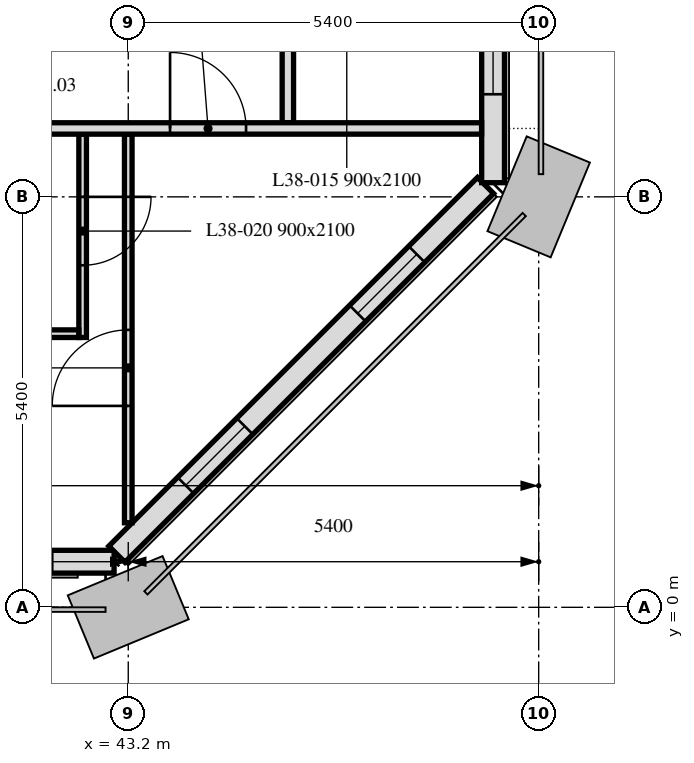
"""IFC4 building model, lengths in metres.
Left out: names, types, materials, properties, quantities, classifications, styles, units other than length and angle.
Written with IfcOpenShell. Run it as: python <this file> out.ifc"""

import sys

from ifc_helpers import new_model, si_unit, direction, frame, frame_2d, origin, place, context, subcontext, project, spatial, rectangle, extrude, element, fill, save


model = new_model("IFC4")
c1 = context("Model", 3, precision=1e-05, world=origin(), true_north=direction((0.0, 1.0)))
c2 = subcontext(c1, "Body", "Model", "MODEL_VIEW")
j1 = project(units=[si_unit("LENGTHUNIT", "METRE"), si_unit("PLANEANGLEUNIT", "RADIAN")], contexts=[c1])
p1 = place(None, origin())
s1 = spatial("IfcSite", under=j1, at=p1, CompositionType="ELEMENT")
p2 = place(p1, origin())
s2 = spatial("IfcBuilding", under=s1, at=p2, CompositionType="ELEMENT")
p3 = place(p2, frame((0.0, 0.0, 162.7)))
s3 = spatial("IfcBuildingStorey", under=s2, at=p3, CompositionType="ELEMENT", Elevation=162.7)
p4 = place(p3, frame((10.986, 0.6, 0.0), z_axis=(0.0, 0.0, 1.0), x_axis=(1.0, 0.0, 0.0)))
e1 = element("IfcWall", 1, at=p4, inside=s3, PredefinedType="SOLIDWALL", context=c2, shape_type="SweptSolid", body=[
    extrude(rectangle(XDim=32.027, YDim=0.3, at=frame_2d((16.014, 0.0))), origin(), (0.0, 0.0, 1.0), 3.0),
])
p5 = place(p4, frame((2.764, 0.0, 0.9)))
e2 = element("IfcOpeningElement", 2, at=p5, cuts=e1, PredefinedType="OPENING", context=c2, shape_type="SweptSolid", body=[
    extrude(rectangle(XDim=1.1, YDim=1.7, at=frame_2d((0.55, 0.85))), frame((0.0, 0.16, 0.0), z_axis=(0.0, -1.0, 0.0), x_axis=(1.0, 0.0, 0.0)), (0.0, 0.0, 1.0), 0.32),
])
p6 = place(p4, frame((6.214, 0.0, 0.9)))
e3 = element("IfcOpeningElement", 3, at=p6, cuts=e1, PredefinedType="OPENING", context=c2, shape_type="SweptSolid", body=[
    extrude(rectangle(XDim=3.4, YDim=1.7, at=frame_2d((1.7, 0.85))), frame((0.0, 0.16, 0.0), z_axis=(0.0, -1.0, 0.0), x_axis=(1.0, 0.0, 0.0)), (0.0, 0.0, 1.0), 0.32),
])
p7 = place(p4, frame((13.564, 0.0, 0.9)))
e4 = element("IfcOpeningElement", 4, at=p7, cuts=e1, PredefinedType="OPENING", context=c2, shape_type="SweptSolid", body=[
    extrude(rectangle(XDim=1.1, YDim=1.7, at=frame_2d((0.55, 0.85))), frame((0.0, 0.16, 0.0), z_axis=(0.0, -1.0, 0.0), x_axis=(1.0, 0.0, 0.0)), (0.0, 0.0, 1.0), 0.32),
])
p8 = place(p4, frame((17.014, 0.0, 0.9)))
e5 = element("IfcOpeningElement", 5, at=p8, cuts=e1, PredefinedType="OPENING", context=c2, shape_type="SweptSolid", body=[
    extrude(rectangle(XDim=3.4, YDim=1.7, at=frame_2d((1.7, 0.85))), frame((0.0, 0.16, 0.0), z_axis=(0.0, -1.0, 0.0), x_axis=(1.0, 0.0, 0.0)), (0.0, 0.0, 1.0), 0.32),
])
p9 = place(p4, frame((24.364, 0.0, 0.9)))
e6 = element("IfcOpeningElement", 6, at=p9, cuts=e1, PredefinedType="OPENING", context=c2, shape_type="SweptSolid", body=[
    extrude(rectangle(XDim=1.1, YDim=1.7, at=frame_2d((0.55, 0.85))), frame((0.0, 0.16, 0.0), z_axis=(0.0, -1.0, 0.0), x_axis=(1.0, 0.0, 0.0)), (0.0, 0.0, 1.0), 0.32),
])
p10 = place(p4, frame((27.814, 0.0, 0.9)))
e7 = element("IfcOpeningElement", 7, at=p10, cuts=e1, PredefinedType="OPENING", context=c2, shape_type="SweptSolid", body=[
    extrude(rectangle(XDim=3.4, YDim=1.7, at=frame_2d((1.7, 0.85))), frame((0.0, 0.16, 0.0), z_axis=(0.0, -1.0, 0.0), x_axis=(1.0, 0.0, 0.0)), (0.0, 0.0, 1.0), 0.32),
])
p11 = place(p3, frame((43.051, 0.699, 0.0), z_axis=(0.0, 0.0, 1.0), x_axis=(0.707106781187, 0.707106781187, 0.0)))
e8 = element("IfcWall", 8, at=p11, inside=s3, PredefinedType="SOLIDWALL", context=c2, shape_type="SweptSolid", body=[
    extrude(rectangle(XDim=6.86, YDim=0.3, at=frame_2d((3.43, 0.0))), origin(), (0.0, 0.0, 1.0), 3.0),
])
p12 = place(p11, frame((1.28, 0.0, 0.9)))
e9 = element("IfcOpeningElement", 9, at=p12, cuts=e8, PredefinedType="OPENING", context=c2, shape_type="SweptSolid", body=[
    extrude(rectangle(XDim=1.1, YDim=1.7, at=frame_2d((0.55, 0.85))), frame((0.0, 0.16, 0.0), z_axis=(0.0, -1.0, 0.0), x_axis=(1.0, 0.0, 0.0)), (0.0, 0.0, 1.0), 0.32),
])
p13 = place(p11, frame((4.48, 0.0, 0.9)))
e10 = element("IfcOpeningElement", 10, at=p13, cuts=e8, PredefinedType="OPENING", context=c2, shape_type="SweptSolid", body=[
    extrude(rectangle(XDim=1.1, YDim=1.7, at=frame_2d((0.55, 0.85))), frame((0.0, 0.16, 0.0), z_axis=(0.0, -1.0, 0.0), x_axis=(1.0, 0.0, 0.0)), (0.0, 0.0, 1.0), 0.32),
])
p14 = place(p3, frame((48.0, 5.586, 0.0), z_axis=(0.0, 0.0, 1.0), x_axis=(0.0, 1.0, 0.0)))
e11 = element("IfcWall", 11, at=p14, inside=s3, PredefinedType="SOLIDWALL", context=c2, shape_type="SweptSolid", body=[
    extrude(rectangle(XDim=32.027, YDim=0.3, at=frame_2d((16.014, 0.0))), origin(), (0.0, 0.0, 1.0), 3.0),
])
p15 = place(p14, frame((1.164, 0.0, 0.9)))
e12 = element("IfcOpeningElement", 12, at=p15, cuts=e11, PredefinedType="OPENING", context=c2, shape_type="SweptSolid", body=[
    extrude(rectangle(XDim=1.1, YDim=1.7, at=frame_2d((0.55, 0.85))), frame((0.0, 0.16, 0.0), z_axis=(0.0, -1.0, 0.0), x_axis=(1.0, 0.0, 0.0)), (0.0, 0.0, 1.0), 0.32),
])
p16 = place(p14, frame((2.589, 0.0, 0.9)))
e13 = element("IfcOpeningElement", 13, at=p16, cuts=e11, PredefinedType="OPENING", context=c2, shape_type="SweptSolid", body=[
    extrude(rectangle(XDim=0.65, YDim=1.7, at=frame_2d((0.325, 0.85))), frame((0.0, 0.16, 0.0), z_axis=(0.0, -1.0, 0.0), x_axis=(1.0, 0.0, 0.0)), (0.0, 0.0, 1.0), 0.32),
])
p17 = place(p14, frame((6.214, 0.0, 0.9)))
e14 = element("IfcOpeningElement", 14, at=p17, cuts=e11, PredefinedType="OPENING", context=c2, shape_type="SweptSolid", body=[
    extrude(rectangle(XDim=3.4, YDim=1.7, at=frame_2d((1.7, 0.85))), frame((0.0, 0.16, 0.0), z_axis=(0.0, -1.0, 0.0), x_axis=(1.0, 0.0, 0.0)), (0.0, 0.0, 1.0), 0.32),
])
p18 = place(p14, frame((11.964, 0.0, 0.9)))
e15 = element("IfcOpeningElement", 15, at=p18, cuts=e11, PredefinedType="OPENING", context=c2, shape_type="SweptSolid", body=[
    extrude(rectangle(XDim=1.1, YDim=1.7, at=frame_2d((0.55, 0.85))), frame((0.0, 0.16, 0.0), z_axis=(0.0, -1.0, 0.0), x_axis=(1.0, 0.0, 0.0)), (0.0, 0.0, 1.0), 0.32),
])
p19 = place(p14, frame((13.564, 0.0, 0.9)))
e16 = element("IfcOpeningElement", 16, at=p19, cuts=e11, PredefinedType="OPENING", context=c2, shape_type="SweptSolid", body=[
    extrude(rectangle(XDim=1.1, YDim=1.7, at=frame_2d((0.55, 0.85))), frame((0.0, 0.16, 0.0), z_axis=(0.0, -1.0, 0.0), x_axis=(1.0, 0.0, 0.0)), (0.0, 0.0, 1.0), 0.32),
])
p20 = place(p14, frame((17.364, 0.0, 0.9)))
e17 = element("IfcOpeningElement", 17, at=p20, cuts=e11, PredefinedType="OPENING", context=c2, shape_type="SweptSolid", body=[
    extrude(rectangle(XDim=1.1, YDim=1.7, at=frame_2d((0.55, 0.85))), frame((0.0, 0.16, 0.0), z_axis=(0.0, -1.0, 0.0), x_axis=(1.0, 0.0, 0.0)), (0.0, 0.0, 1.0), 0.32),
])
p21 = place(p14, frame((18.964, 0.0, 0.9)))
e18 = element("IfcOpeningElement", 18, at=p21, cuts=e11, PredefinedType="OPENING", context=c2, shape_type="SweptSolid", body=[
    extrude(rectangle(XDim=1.1, YDim=1.7, at=frame_2d((0.55, 0.85))), frame((0.0, 0.16, 0.0), z_axis=(0.0, -1.0, 0.0), x_axis=(1.0, 0.0, 0.0)), (0.0, 0.0, 1.0), 0.32),
])
p22 = place(p14, frame((22.764, 0.0, 0.9)))
e19 = element("IfcOpeningElement", 19, at=p22, cuts=e11, PredefinedType="OPENING", context=c2, shape_type="SweptSolid", body=[
    extrude(rectangle(XDim=1.1, YDim=1.7, at=frame_2d((0.55, 0.85))), frame((0.0, 0.16, 0.0), z_axis=(0.0, -1.0, 0.0), x_axis=(1.0, 0.0, 0.0)), (0.0, 0.0, 1.0), 0.32),
])
p23 = place(p14, frame((24.364, 0.0, 0.9)))
e20 = element("IfcOpeningElement", 20, at=p23, cuts=e11, PredefinedType="OPENING", context=c2, shape_type="SweptSolid", body=[
    extrude(rectangle(XDim=1.1, YDim=1.7, at=frame_2d((0.55, 0.85))), frame((0.0, 0.16, 0.0), z_axis=(0.0, -1.0, 0.0), x_axis=(1.0, 0.0, 0.0)), (0.0, 0.0, 1.0), 0.32),
])
p24 = place(p14, frame((28.164, 0.0, 0.9)))
e21 = element("IfcOpeningElement", 21, at=p24, cuts=e11, PredefinedType="OPENING", context=c2, shape_type="SweptSolid", body=[
    extrude(rectangle(XDim=1.1, YDim=1.7, at=frame_2d((0.55, 0.85))), frame((0.0, 0.16, 0.0), z_axis=(0.0, -1.0, 0.0), x_axis=(1.0, 0.0, 0.0)), (0.0, 0.0, 1.0), 0.32),
])
p25 = place(p14, frame((29.764, 0.0, 0.9)))
e22 = element("IfcOpeningElement", 22, at=p25, cuts=e11, PredefinedType="OPENING", context=c2, shape_type="SweptSolid", body=[
    extrude(rectangle(XDim=1.1, YDim=1.7, at=frame_2d((0.55, 0.85))), frame((0.0, 0.16, 0.0), z_axis=(0.0, -1.0, 0.0), x_axis=(1.0, 0.0, 0.0)), (0.0, 0.0, 1.0), 0.32),
])
p26 = place(p3, frame((45.3, 21.525, 0.0), z_axis=(0.0, 0.0, 1.0), x_axis=(0.0, -1.0, 0.0)))
e23 = element("IfcWall", 23, at=p26, inside=s3, PredefinedType="PARTITIONING", context=c2, shape_type="SweptSolid", body=[
    extrude(rectangle(XDim=15.15, YDim=0.15, at=frame_2d((7.575, 0.0))), origin(), (0.0, 0.0, 1.0), 2.4),
])
p27 = place(p26, frame((2.125, 0.0, 0.0)))
e24 = element("IfcOpeningElement", 24, at=p27, cuts=e23, PredefinedType="OPENING", context=c2, shape_type="SweptSolid", body=[
    extrude(rectangle(XDim=1.0, YDim=2.1, at=frame_2d((0.5, 1.05))), frame((0.0, 0.075, 0.0), z_axis=(0.0, -1.0, 0.0), x_axis=(1.0, 0.0, 0.0)), (0.0, 0.0, 1.0), 0.15),
])
p28 = place(p26, frame((7.958, 0.0, 0.0)))
e25 = element("IfcOpeningElement", 25, at=p28, cuts=e23, PredefinedType="OPENING", context=c2, shape_type="SweptSolid", body=[
    extrude(rectangle(XDim=1.0, YDim=2.1, at=frame_2d((0.5, 1.05))), frame((0.0, 0.075, 0.0), z_axis=(0.0, -1.0, 0.0), x_axis=(1.0, 0.0, 0.0)), (0.0, 0.0, 1.0), 0.15),
])
p29 = place(p3, frame((43.2, 1.112, 0.0), z_axis=(0.0, 0.0, 1.0), x_axis=(0.0, 1.0, 0.0)))
e26 = element("IfcWall", 26, at=p29, inside=s3, PredefinedType="PARTITIONING", context=c2, shape_type="SweptSolid", body=[
    extrude(rectangle(XDim=5.113, YDim=0.1, at=frame_2d((2.557, 0.0))), origin(), (0.0, 0.0, 1.0), 3.0),
])
p30 = place(p29, frame((1.538, 0.0, 0.0)))
e27 = element("IfcOpeningElement", 27, at=p30, cuts=e26, PredefinedType="OPENING", context=c2, shape_type="SweptSolid", body=[
    extrude(rectangle(XDim=1.0, YDim=2.1, at=frame_2d((0.5, 1.05))), frame((0.0, 0.05, 0.0), z_axis=(0.0, -1.0, 0.0), x_axis=(1.0, 0.0, 0.0)), (0.0, 0.0, 1.0), 0.1),
])
p31 = place(p3, frame((42.6, 6.225, 0.0), z_axis=(0.0, 0.0, 1.0), x_axis=(0.0, -1.0, 0.0)))
e28 = element("IfcWall", 28, at=p31, inside=s3, PredefinedType="PARTITIONING", context=c2, shape_type="SweptSolid", body=[
    extrude(rectangle(XDim=2.675, YDim=0.1, at=frame_2d((1.337, 0.0))), origin(), (0.0, 0.0, 1.0), 3.0),
])
p32 = place(p31, frame((0.825, 0.0, 0.0)))
e29 = element("IfcOpeningElement", 29, at=p32, cuts=e28, PredefinedType="OPENING", context=c2, shape_type="SweptSolid", body=[
    extrude(rectangle(XDim=0.9, YDim=2.1, at=frame_2d((0.45, 1.05))), frame((0.0, 0.05, 0.0), z_axis=(0.0, -1.0, 0.0), x_axis=(1.0, 0.0, 0.0)), (0.0, 0.0, 1.0), 0.1),
])
p33 = place(p3, frame((42.55, 3.6, 0.0), z_axis=(0.0, 0.0, 1.0), x_axis=(-1.0, 0.0, 0.0)))
e30 = element("IfcWall", 30, at=p33, inside=s3, PredefinedType="PARTITIONING", context=c2, shape_type="SweptSolid", body=[
    extrude(rectangle(XDim=2.4, YDim=0.1, at=frame_2d((1.2, 0.0))), origin(), (0.0, 0.0, 1.0), 3.0),
])
p34 = place(p3, frame((6.151, 6.3, 0.0), z_axis=(0.0, 0.0, 1.0), x_axis=(1.0, 0.0, 0.0)))
e31 = element("IfcWall", 31, at=p34, inside=s3, PredefinedType="PARTITIONING", context=c2, shape_type="SweptSolid", body=[
    extrude(rectangle(XDim=41.698, YDim=0.15, at=frame_2d((20.849, 0.0))), origin(), (0.0, 0.0, 1.0), 2.4),
])
p35 = place(p34, frame((1.132, 0.0, 0.0)))
e32 = element("IfcOpeningElement", 32, at=p35, cuts=e31, PredefinedType="OPENING", context=c2, shape_type="SweptSolid", body=[
    extrude(rectangle(XDim=1.0, YDim=2.1, at=frame_2d((0.5, 1.05))), frame((0.0, 0.075, 0.0), z_axis=(0.0, -1.0, 0.0), x_axis=(1.0, 0.0, 0.0)), (0.0, 0.0, 1.0), 0.15),
])
p36 = place(p34, frame((13.049, 0.0, 0.0)))
e33 = element("IfcOpeningElement", 33, at=p36, cuts=e31, PredefinedType="OPENING", context=c2, shape_type="SweptSolid", body=[
    extrude(rectangle(XDim=1.0, YDim=2.1, at=frame_2d((0.5, 1.05))), frame((0.0, 0.075, 0.0), z_axis=(0.0, -1.0, 0.0), x_axis=(1.0, 0.0, 0.0)), (0.0, 0.0, 1.0), 0.15),
])
p37 = place(p34, frame((17.649, 0.0, 0.0)))
e34 = element("IfcOpeningElement", 34, at=p37, cuts=e31, PredefinedType="OPENING", context=c2, shape_type="SweptSolid", body=[
    extrude(rectangle(XDim=1.0, YDim=2.1, at=frame_2d((0.5, 1.05))), frame((0.0, 0.075, 0.0), z_axis=(0.0, -1.0, 0.0), x_axis=(1.0, 0.0, 0.0)), (0.0, 0.0, 1.0), 0.15),
])
p38 = place(p34, frame((29.249, 0.0, 0.0)))
e35 = element("IfcOpeningElement", 35, at=p38, cuts=e31, PredefinedType="OPENING", context=c2, shape_type="SweptSolid", body=[
    extrude(rectangle(XDim=1.0, YDim=2.1, at=frame_2d((0.5, 1.05))), frame((0.0, 0.075, 0.0), z_axis=(0.0, -1.0, 0.0), x_axis=(1.0, 0.0, 0.0)), (0.0, 0.0, 1.0), 0.15),
])
p39 = place(p34, frame((37.599, 0.0, 0.0)))
e36 = element("IfcOpeningElement", 36, at=p39, cuts=e31, PredefinedType="OPENING", context=c2, shape_type="SweptSolid", body=[
    extrude(rectangle(XDim=1.0, YDim=2.1, at=frame_2d((0.5, 1.05))), frame((0.0, 0.075, 0.0), z_axis=(0.0, -1.0, 0.0), x_axis=(1.0, 0.0, 0.0)), (0.0, 0.0, 1.0), 0.15),
])
p40 = place(p12, origin())
e37 = element("IfcWindow", 37, at=p40, inside=s3, PartitioningType="SINGLE_PANEL", PredefinedType="WINDOW", context=c2, shape_type="SweptSolid", body=[
    extrude(rectangle(XDim=1.1, YDim=1.7, at=frame_2d((0.55, 0.85))), frame((0.0, 0.03, 0.0), z_axis=(0.0, -1.0, 0.0), x_axis=(1.0, 0.0, 0.0)), (0.0, 0.0, 1.0), 0.06),
])
fill(e9, e37)
p41 = place(p13, origin())
e38 = element("IfcWindow", 38, at=p41, inside=s3, PartitioningType="SINGLE_PANEL", PredefinedType="WINDOW", context=c2, shape_type="SweptSolid", body=[
    extrude(rectangle(XDim=1.1, YDim=1.7, at=frame_2d((0.55, 0.85))), frame((0.0, 0.03, 0.0), z_axis=(0.0, -1.0, 0.0), x_axis=(1.0, 0.0, 0.0)), (0.0, 0.0, 1.0), 0.06),
])
fill(e10, e38)
p42 = place(p15, origin())
e39 = element("IfcWindow", 39, at=p42, inside=s3, PartitioningType="SINGLE_PANEL", PredefinedType="WINDOW", context=c2, shape_type="SweptSolid", body=[
    extrude(rectangle(XDim=1.1, YDim=1.7, at=frame_2d((0.55, 0.85))), frame((0.0, 0.03, 0.0), z_axis=(0.0, -1.0, 0.0), x_axis=(1.0, 0.0, 0.0)), (0.0, 0.0, 1.0), 0.06),
])
fill(e12, e39)
p43 = place(p32, origin())
e40 = element("IfcDoor", 40, at=p43, inside=s3, OperationType="SINGLE_SWING_LEFT", PredefinedType="DOOR", context=c2, shape_type="SweptSolid", body=[
    extrude(rectangle(XDim=0.9, YDim=2.1, at=frame_2d((0.45, 1.05))), frame((0.0, 0.025, 0.0), z_axis=(0.0, -1.0, 0.0), x_axis=(1.0, 0.0, 0.0)), (0.0, 0.0, 1.0), 0.05),
])
fill(e29, e40)
p44 = place(p30, origin())
e41 = element("IfcDoor", 41, at=p44, inside=s3, OperationType="SINGLE_SWING_LEFT", PredefinedType="DOOR", context=c2, shape_type="SweptSolid", body=[
    extrude(rectangle(XDim=1.0, YDim=2.1, at=frame_2d((0.5, 1.05))), frame((0.0, 0.025, 0.0), z_axis=(0.0, -1.0, 0.0), x_axis=(1.0, 0.0, 0.0)), (0.0, 0.0, 1.0), 0.05),
])
fill(e27, e41)
p45 = place(p39, origin())
e42 = element("IfcDoor", 42, at=p45, inside=s3, OperationType="SINGLE_SWING_RIGHT", PredefinedType="DOOR", context=c2, shape_type="SweptSolid", body=[
    extrude(rectangle(XDim=1.0, YDim=2.1, at=frame_2d((0.5, 1.05))), frame((0.0, 0.025, 0.0), z_axis=(0.0, -1.0, 0.0), x_axis=(1.0, 0.0, 0.0)), (0.0, 0.0, 1.0), 0.05),
])
fill(e36, e42)
save(model, sys.argv[1])
